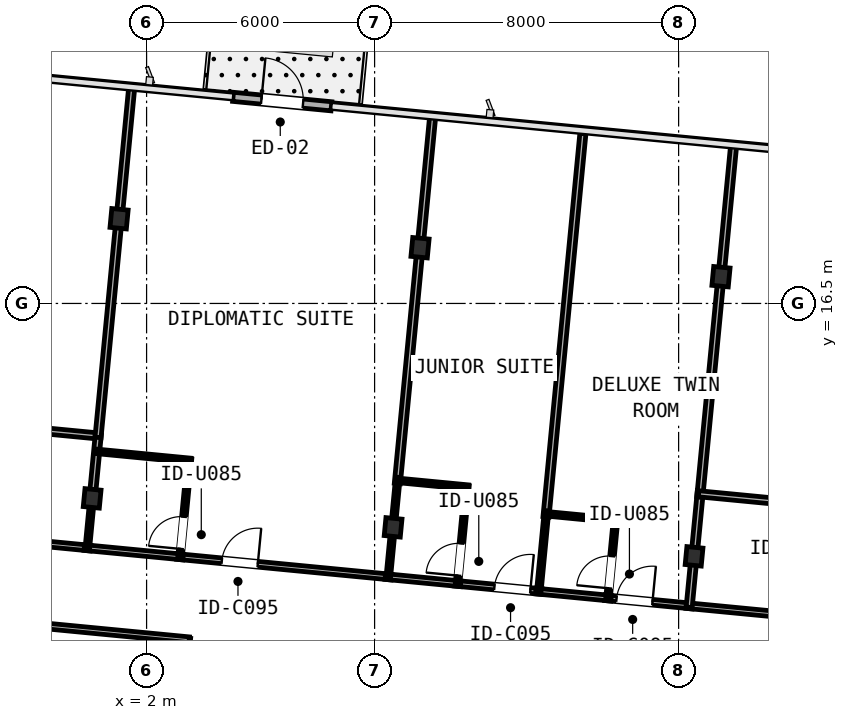
"""IFC4 building model, lengths in metres.
Left out: names, types, materials, properties, quantities, classifications, styles, units other than length and angle.
Written with IfcOpenShell. Run it as: python <this file> out.ifc"""

import sys

from ifc_helpers import new_model, si_unit, direction, frame, frame_2d, origin, origin_2d, place, context, subcontext, project, spatial, rectangle, i_section, extrude, element, fill, save


model = new_model("IFC4")
c1 = context("Model", 3, precision=1e-05, world=origin(), true_north=direction((0.0, 1.0)))
c2 = subcontext(c1, "Body", "Model", "MODEL_VIEW")
j1 = project(units=[si_unit("LENGTHUNIT", "METRE"), si_unit("PLANEANGLEUNIT", "RADIAN")], contexts=[c1])
p1 = place(None, origin())
s1 = spatial("IfcSite", under=j1, at=p1, CompositionType="ELEMENT")
p2 = place(p1, origin())
s2 = spatial("IfcBuilding", under=s1, at=p2, CompositionType="ELEMENT")
p3 = place(p2, frame((0.0, 0.0, 142.8)))
s3 = spatial("IfcBuildingStorey", under=s2, at=p3, CompositionType="ELEMENT", Elevation=142.8)
p4 = place(p3, frame((0.568, 11.371, 0.0), z_axis=(0.0, 0.0, 1.0), x_axis=(0.995396198367, -0.09584575252, 0.0)))
e1 = element("IfcColumn", 1, at=p4, inside=s3, PredefinedType="COLUMN", context=c2, shape_type="SweptSolid", body=[
    extrude(i_section(OverallWidth=0.424, OverallDepth=0.474, WebThickness=0.048, FlangeThickness=0.077, FilletRadius=0.031, at=origin_2d()), origin(), (0.0, 0.0, 1.0), 3.45),
])
p5 = place(p3, frame((1.276, 18.729, 0.0), z_axis=(0.0, 0.0, 1.0), x_axis=(0.995396198367, -0.09584575252, 0.0)))
e2 = element("IfcColumn", 2, at=p5, inside=s3, PredefinedType="COLUMN", context=c2, shape_type="SweptSolid", body=[
    extrude(i_section(OverallWidth=0.432, OverallDepth=0.498, WebThickness=0.056, FlangeThickness=0.089, FilletRadius=0.031, at=origin_2d()), origin(), (0.0, 0.0, 1.0), 3.45),
])
p6 = place(p3, frame((8.487, 10.609, 0.0), z_axis=(0.0, 0.0, 1.0), x_axis=(0.995396198367, -0.09584575252, 0.0)))
e3 = element("IfcColumn", 3, at=p6, inside=s3, PredefinedType="COLUMN", context=c2, shape_type="SweptSolid", body=[
    extrude(i_section(OverallWidth=0.424, OverallDepth=0.474, WebThickness=0.048, FlangeThickness=0.077, FilletRadius=0.031, at=origin_2d()), origin(), (0.0, 0.0, 1.0), 3.45),
])
p7 = place(p3, frame((9.195, 17.967, 0.0), z_axis=(0.0, 0.0, 1.0), x_axis=(0.995396198367, -0.09584575252, 0.0)))
e4 = element("IfcColumn", 4, at=p7, inside=s3, PredefinedType="COLUMN", context=c2, shape_type="SweptSolid", body=[
    extrude(i_section(OverallWidth=0.432, OverallDepth=0.498, WebThickness=0.056, FlangeThickness=0.089, FilletRadius=0.031, at=origin_2d()), origin(), (0.0, 0.0, 1.0), 3.45),
])
p8 = place(p3, frame((16.406, 9.846, 0.0), z_axis=(0.0, 0.0, 1.0), x_axis=(0.995396198367, -0.09584575252, 0.0)))
e5 = element("IfcColumn", 5, at=p8, inside=s3, PredefinedType="COLUMN", context=c2, shape_type="SweptSolid", body=[
    extrude(i_section(OverallWidth=0.424, OverallDepth=0.474, WebThickness=0.048, FlangeThickness=0.077, FilletRadius=0.031, at=origin_2d()), origin(), (0.0, 0.0, 1.0), 3.45),
])
p9 = place(p3, frame((17.115, 17.204, 0.0), z_axis=(0.0, 0.0, 1.0), x_axis=(0.995396198367, -0.09584575252, 0.0)))
e6 = element("IfcColumn", 6, at=p9, inside=s3, PredefinedType="COLUMN", context=c2, shape_type="SweptSolid", body=[
    extrude(i_section(OverallWidth=0.432, OverallDepth=0.498, WebThickness=0.056, FlangeThickness=0.089, FilletRadius=0.031, at=origin_2d()), origin(), (0.0, 0.0, 1.0), 3.45),
])
p10 = place(p3, frame((4.275, 21.937, 0.0), z_axis=(0.0, 0.0, 1.0), x_axis=(0.995394049959, -0.095868061976, 0.0)))
e7 = element("IfcWall", 7, at=p10, inside=s3, PredefinedType="STANDARD", context=c2, shape_type="SweptSolid", body=[
    extrude(rectangle(XDim=2.6, YDim=0.24, at=frame_2d((1.3, 0.0))), origin(), (0.0, 0.0, 1.0), 3.19),
])
p11 = place(p10, frame((0.75, 0.0, 0.0)))
e8 = element("IfcOpeningElement", 8, at=p11, cuts=e7, PredefinedType="OPENING", context=c2, shape_type="SweptSolid", body=[
    extrude(rectangle(XDim=1.1, YDim=2.15, at=frame_2d((0.55, 1.075))), frame((0.0, 0.13, 0.0), z_axis=(0.0, -1.0, 0.0), x_axis=(1.0, 0.0, 0.0)), (0.0, 0.0, 1.0), 0.26),
])
p12 = place(p3, frame((-7.559, 10.84, 0.0), z_axis=(0.0, 0.0, 1.0), x_axis=(0.995395467524, -0.095853342309, 0.0)))
e9 = element("IfcWall", 9, at=p12, inside=s3, PredefinedType="PARTITIONING", context=c2, shape_type="SweptSolid", body=[
    extrude(rectangle(XDim=8.12, YDim=0.15, at=frame_2d((4.06, 0.0))), origin(), (0.0, 0.0, 1.0), 2.479),
])
p13 = place(p12, frame((3.585, 0.0, 0.0)))
e10 = element("IfcOpeningElement", 10, at=p13, cuts=e9, PredefinedType="OPENING", context=c2, shape_type="SweptSolid", body=[
    extrude(rectangle(XDim=0.95, YDim=2.15, at=frame_2d((0.475, 1.075))), frame((0.0, 0.085, 0.0), z_axis=(0.0, -1.0, 0.0), x_axis=(1.0, 0.0, 0.0)), (0.0, 0.0, 1.0), 0.17),
])
p14 = place(p3, frame((2.799, 9.842, 0.0), z_axis=(0.0, 0.0, 1.0), x_axis=(0.995395844771, -0.095849424686, 0.0)))
e11 = element("IfcWall", 11, at=p14, inside=s3, PredefinedType="PARTITIONING", context=c2, shape_type="SweptSolid", body=[
    extrude(rectangle(XDim=5.67, YDim=0.15, at=frame_2d((2.835, 0.0))), origin(), (0.0, 0.0, 1.0), 2.479),
])
p15 = place(p14, frame((1.186, 0.0, 0.0)))
e12 = element("IfcOpeningElement", 12, at=p15, cuts=e11, PredefinedType="OPENING", context=c2, shape_type="SweptSolid", body=[
    extrude(rectangle(XDim=0.95, YDim=2.15, at=frame_2d((0.475, 1.075))), frame((0.0, 0.085, 0.0), z_axis=(0.0, -1.0, 0.0), x_axis=(1.0, 0.0, 0.0)), (0.0, 0.0, 1.0), 0.17),
])
p16 = place(p3, frame((0.361, 10.077, 0.0), z_axis=(0.0, 0.0, 1.0), x_axis=(0.995397556197, -0.095831649869, 0.0)))
e13 = element("IfcWall", 13, at=p16, inside=s3, PredefinedType="PARTITIONING", context=c2, shape_type="SweptSolid", body=[
    extrude(rectangle(XDim=2.614, YDim=0.15, at=frame_2d((1.307, 0.0))), origin(), (0.0, 0.0, 1.0), 2.479),
])
p17 = place(p3, frame((10.101, 9.139, 0.0), z_axis=(0.0, 0.0, 1.0), x_axis=(0.995393345625, -0.095875374756, 0.0)))
e14 = element("IfcWall", 14, at=p17, inside=s3, PredefinedType="PARTITIONING", context=c2, shape_type="SweptSolid", body=[
    extrude(rectangle(XDim=2.312, YDim=0.15, at=frame_2d((1.156, 0.0))), origin(), (0.0, 0.0, 1.0), 2.718),
])
p18 = place(p17, frame((1.056, 0.0, 0.0)))
e15 = element("IfcOpeningElement", 15, at=p18, cuts=e14, PredefinedType="OPENING", context=c2, shape_type="SweptSolid", body=[
    extrude(rectangle(XDim=0.95, YDim=2.15, at=frame_2d((0.475, 1.075))), frame((0.0, 0.085, 0.0), z_axis=(0.0, -1.0, 0.0), x_axis=(1.0, 0.0, 0.0)), (0.0, 0.0, 1.0), 0.17),
])
p19 = place(p3, frame((8.28, 9.314, 0.0), z_axis=(0.0, 0.0, 1.0), x_axis=(0.995393086543, -0.095878064554, 0.0)))
e16 = element("IfcWall", 16, at=p19, inside=s3, PredefinedType="PARTITIONING", context=c2, shape_type="SweptSolid", body=[
    extrude(rectangle(XDim=1.994, YDim=0.15, at=frame_2d((0.997, 0.0))), origin(), (0.0, 0.0, 1.0), 2.479),
])
p20 = place(p3, frame((14.061, 8.758, 0.0), z_axis=(0.0, 0.0, 1.0), x_axis=(0.995393345625, -0.095875374756, 0.0)))
e17 = element("IfcWall", 17, at=p20, inside=s3, PredefinedType="PARTITIONING", context=c2, shape_type="SweptSolid", body=[
    extrude(rectangle(XDim=2.312, YDim=0.15, at=frame_2d((1.156, 0.0))), origin(), (0.0, 0.0, 1.0), 2.479),
])
p21 = place(p20, frame((0.306, 0.0, 0.0)))
e18 = element("IfcOpeningElement", 18, at=p21, cuts=e17, PredefinedType="OPENING", context=c2, shape_type="SweptSolid", body=[
    extrude(rectangle(XDim=0.95, YDim=2.15, at=frame_2d((0.475, 1.075))), frame((0.0, 0.085, 0.0), z_axis=(0.0, -1.0, 0.0), x_axis=(1.0, 0.0, 0.0)), (0.0, 0.0, 1.0), 0.17),
])
p22 = place(p3, frame((12.24, 8.933, 0.0), z_axis=(0.0, 0.0, 1.0), x_axis=(0.995405888026, -0.095745068196, 0.0)))
e19 = element("IfcWall", 19, at=p22, inside=s3, PredefinedType="PARTITIONING", context=c2, shape_type="SweptSolid", body=[
    extrude(rectangle(XDim=1.994, YDim=0.15, at=frame_2d((0.997, 0.0))), origin(), (0.0, 0.0, 1.0), 2.718),
])
p23 = place(p3, frame((16.199, 8.552, 0.0), z_axis=(0.0, 0.0, 1.0), x_axis=(0.995391104887, -0.095898635608, 0.0)))
e20 = element("IfcWall", 20, at=p23, inside=s3, PredefinedType="PARTITIONING", context=c2, shape_type="SweptSolid", body=[
    extrude(rectangle(XDim=3.722, YDim=0.15, at=frame_2d((1.861, 0.0))), origin(), (0.0, 0.0, 1.0), 2.479),
])
p24 = place(p23, frame((2.457, 0.0, 0.0)))
e21 = element("IfcOpeningElement", 21, at=p24, cuts=e20, PredefinedType="OPENING", context=c2, shape_type="SweptSolid", body=[
    extrude(rectangle(XDim=0.95, YDim=2.15, at=frame_2d((0.475, 1.075))), frame((0.0, 0.085, 0.0), z_axis=(0.0, -1.0, 0.0), x_axis=(1.0, 0.0, 0.0)), (0.0, 0.0, 1.0), 0.17),
])
p25 = place(p3, frame((2.838, 5.135, 0.0), z_axis=(0.0, 0.0, 1.0), x_axis=(0.095772090971, 0.995403288417, 0.0)))
e22 = element("IfcWall", 22, at=p25, inside=s3, PredefinedType="PARTITIONING", context=c2, shape_type="SweptSolid", body=[
    extrude(rectangle(XDim=2.572, YDim=0.15, at=frame_2d((1.286, 0.0))), origin(), (0.0, 0.0, 1.0), 2.479),
])
p26 = place(p3, frame((3.121, 7.651, 0.0), z_axis=(0.0, 0.0, 1.0), x_axis=(-0.995397135603, 0.095836018457, 0.0)))
e23 = element("IfcWall", 23, at=p26, inside=s3, PredefinedType="PARTITIONING", context=c2, shape_type="SweptSolid", body=[
    extrude(rectangle(XDim=18.892, YDim=0.15, at=frame_2d((9.446, 0.0))), origin(), (0.0, 0.0, 1.0), 2.479),
])
p27 = place(p26, frame((14.502, 0.0, 0.0)))
e24 = element("IfcOpeningElement", 24, at=p27, cuts=e23, PredefinedType="OPENING", context=c2, shape_type="SweptSolid", body=[
    extrude(rectangle(XDim=0.95, YDim=2.15, at=frame_2d((0.475, 1.075))), frame((0.0, 0.085, 0.0), z_axis=(0.0, -1.0, 0.0), x_axis=(1.0, 0.0, 0.0)), (0.0, 0.0, 1.0), 0.17),
])
p28 = place(p3, frame((-3.284, 13.4, 0.0), z_axis=(0.0, 0.0, 1.0), x_axis=(0.995395934192, -0.095848496045, 0.0)))
e25 = element("IfcWall", 25, at=p28, inside=s3, PredefinedType="PARTITIONING", context=c2, shape_type="SweptSolid", body=[
    extrude(rectangle(XDim=4.068, YDim=0.16, at=frame_2d((2.034, 0.0))), origin(), (0.0, 0.0, 1.0), 2.479),
])
p29 = place(p28, frame((0.386, 0.0, 0.0)))
e26 = element("IfcOpeningElement", 26, at=p29, cuts=e25, PredefinedType="OPENING", context=c2, shape_type="SweptSolid", body=[
    extrude(rectangle(XDim=0.95, YDim=2.15, at=frame_2d((0.475, 1.075))), frame((0.0, 0.09, 0.0), z_axis=(0.0, -1.0, 0.0), x_axis=(1.0, 0.0, 0.0)), (0.0, 0.0, 1.0), 0.18),
])
p30 = place(p3, frame((0.729, 13.053, 0.0), z_axis=(0.0, 0.0, 1.0), x_axis=(-0.095783075571, -0.995402231479, 0.0)))
e27 = element("IfcWall", 27, at=p30, inside=s3, PredefinedType="PARTITIONING", context=c2, shape_type="SweptSolid", body=[
    extrude(rectangle(XDim=1.514, YDim=0.16, at=frame_2d((0.757, 0.0))), origin(), (0.0, 0.0, 1.0), 2.479),
])
p31 = place(p3, frame((0.551, 11.196, 0.0), z_axis=(0.0, 0.0, 1.0), x_axis=(-0.096017994315, -0.995379598328, 0.0)))
e28 = element("IfcWall", 28, at=p31, inside=s3, PredefinedType="PARTITIONING", context=c2, shape_type="SweptSolid", body=[
    extrude(rectangle(XDim=1.172, YDim=0.12, at=frame_2d((0.586, 0.0))), origin(), (0.0, 0.0, 1.0), 2.479),
])
p32 = place(p3, frame((1.259, 18.554, 0.0), z_axis=(0.0, 0.0, 1.0), x_axis=(-0.095807834241, -0.995399848753, 0.0)))
e29 = element("IfcWall", 29, at=p32, inside=s3, PredefinedType="PARTITIONING", context=c2, shape_type="SweptSolid", body=[
    extrude(rectangle(XDim=5.606, YDim=0.16, at=frame_2d((2.803, 0.0))), origin(), (0.0, 0.0, 1.0), 2.479),
])
p33 = place(p3, frame((1.613, 22.233, 0.0), z_axis=(0.0, 0.0, 1.0), x_axis=(-0.095787528641, -0.99540180297, 0.0)))
e30 = element("IfcWall", 30, at=p33, inside=s3, PredefinedType="PARTITIONING", context=c2, shape_type="SweptSolid", body=[
    extrude(rectangle(XDim=3.344, YDim=0.16, at=frame_2d((1.672, 0.0))), origin(), (0.0, 0.0, 1.0), 3.19),
])
p34 = place(p3, frame((2.877, 9.794, 0.0), z_axis=(0.0, 0.0, 1.0), x_axis=(0.095891053428, 0.995391835345, 0.0)))
e31 = element("IfcWall", 31, at=p34, inside=s3, PredefinedType="PARTITIONING", context=c2, shape_type="SweptSolid", body=[
    extrude(rectangle(XDim=2.63, YDim=0.12, at=frame_2d((1.315, 0.0))), origin(), (0.0, 0.0, 1.0), 2.479),
])
p35 = place(p34, frame((0.247, 0.0, 0.0)))
e32 = element("IfcOpeningElement", 32, at=p35, cuts=e31, PredefinedType="OPENING", context=c2, shape_type="SweptSolid", body=[
    extrude(rectangle(XDim=0.85, YDim=2.1, at=frame_2d((0.425, 1.05))), frame((0.0, 0.07, 0.0), z_axis=(0.0, -1.0, 0.0), x_axis=(1.0, 0.0, 0.0)), (0.0, 0.0, 1.0), 0.14),
])
p36 = place(p3, frame((3.165, 12.369, 0.0), z_axis=(0.0, 0.0, 1.0), x_axis=(-0.995389028655, 0.095920183663, 0.0)))
e33 = element("IfcWall", 33, at=p36, inside=s3, PredefinedType="PARTITIONING", context=c2, shape_type="SweptSolid", body=[
    extrude(rectangle(XDim=2.53, YDim=0.12, at=frame_2d((1.265, 0.0))), origin(), (0.0, 0.0, 1.0), 2.479),
])
p37 = place(p3, frame((9.178, 17.791, 0.0), z_axis=(0.0, 0.0, 1.0), x_axis=(-0.095826863488, -0.995398016993, 0.0)))
e34 = element("IfcWall", 34, at=p37, inside=s3, PredefinedType="PARTITIONING", context=c2, shape_type="SweptSolid", body=[
    extrude(rectangle(XDim=6.056, YDim=0.16, at=frame_2d((3.028, 0.0))), origin(), (0.0, 0.0, 1.0), 2.479),
])
p38 = place(p3, frame((9.533, 21.47, 0.0), z_axis=(0.0, 0.0, 1.0), x_axis=(-0.095859866796, -0.995394839216, 0.0)))
e35 = element("IfcWall", 35, at=p38, inside=s3, PredefinedType="PARTITIONING", context=c2, shape_type="SweptSolid", body=[
    extrude(rectangle(XDim=3.344, YDim=0.16, at=frame_2d((1.672, 0.0))), origin(), (0.0, 0.0, 1.0), 3.19),
])
p39 = place(p3, frame((8.47, 10.433, 0.0), z_axis=(0.0, 0.0, 1.0), x_axis=(-0.095831494917, -0.995397571115, 0.0)))
e36 = element("IfcWall", 36, at=p39, inside=s3, PredefinedType="PARTITIONING", context=c2, shape_type="SweptSolid", body=[
    extrude(rectangle(XDim=1.172, YDim=0.12, at=frame_2d((0.586, 0.0))), origin(), (0.0, 0.0, 1.0), 2.479),
])
p40 = place(p3, frame((8.614, 11.927, 0.0), z_axis=(0.0, 0.0, 1.0), x_axis=(-0.09590284245, -0.99539069958, 0.0)))
e37 = element("IfcWall", 37, at=p40, inside=s3, PredefinedType="PARTITIONING", context=c2, shape_type="SweptSolid", body=[
    extrude(rectangle(XDim=1.148, YDim=0.12, at=frame_2d((0.574, 0.0))), origin(), (0.0, 0.0, 1.0), 2.479),
])
p41 = place(p3, frame((10.179, 9.091, 0.0), z_axis=(0.0, 0.0, 1.0), x_axis=(0.095799078022, 0.995400691506, 0.0)))
e38 = element("IfcWall", 38, at=p41, inside=s3, PredefinedType="PARTITIONING", context=c2, shape_type="SweptSolid", body=[
    extrude(rectangle(XDim=2.63, YDim=0.12, at=frame_2d((1.315, 0.0))), origin(), (0.0, 0.0, 1.0), 2.479),
])
p42 = place(p41, frame((0.247, 0.0, 0.0)))
e39 = element("IfcOpeningElement", 39, at=p42, cuts=e38, PredefinedType="OPENING", context=c2, shape_type="SweptSolid", body=[
    extrude(rectangle(XDim=0.85, YDim=2.1, at=frame_2d((0.425, 1.05))), frame((0.0, 0.07, 0.0), z_axis=(0.0, -1.0, 0.0), x_axis=(1.0, 0.0, 0.0)), (0.0, 0.0, 1.0), 0.14),
])
p43 = place(p3, frame((10.467, 11.666, 0.0), z_axis=(0.0, 0.0, 1.0), x_axis=(-0.995405983929, 0.095744071139, 0.0)))
e40 = element("IfcWall", 40, at=p43, inside=s3, PredefinedType="PARTITIONING", context=c2, shape_type="SweptSolid", body=[
    extrude(rectangle(XDim=1.91, YDim=0.12, at=frame_2d((0.955, 0.0))), origin(), (0.0, 0.0, 1.0), 2.479),
])
p44 = place(p3, frame((13.481, 20.97, 0.0), z_axis=(0.0, 0.0, 1.0), x_axis=(-0.095852900965, -0.995395510024, 0.0)))
e41 = element("IfcWall", 41, at=p44, inside=s3, PredefinedType="PARTITIONING", context=c2, shape_type="SweptSolid", body=[
    extrude(rectangle(XDim=10.132, YDim=0.16, at=frame_2d((5.066, 0.0))), origin(), (0.0, 0.0, 1.0), 2.557),
])
p45 = place(p3, frame((12.526, 11.048, 0.0), z_axis=(0.0, 0.0, 1.0), x_axis=(-0.095875173929, -0.995393364969, 0.0)))
e42 = element("IfcWall", 42, at=p45, inside=s3, PredefinedType="PARTITIONING", context=c2, shape_type="SweptSolid", body=[
    extrude(rectangle(XDim=2.172, YDim=0.12, at=frame_2d((1.086, 0.0))), origin(), (0.0, 0.0, 1.0), 2.479),
])
p46 = place(p3, frame((14.139, 8.71, 0.0), z_axis=(0.0, 0.0, 1.0), x_axis=(0.095825980341, 0.995398102013, 0.0)))
e43 = element("IfcWall", 43, at=p46, inside=s3, PredefinedType="PARTITIONING", context=c2, shape_type="SweptSolid", body=[
    extrude(rectangle(XDim=2.13, YDim=0.12, at=frame_2d((1.065, 0.0))), origin(), (0.0, 0.0, 1.0), 2.479),
])
p47 = place(p46, frame((0.296, 0.0, 0.0)))
e44 = element("IfcOpeningElement", 44, at=p47, cuts=e43, PredefinedType="OPENING", context=c2, shape_type="SweptSolid", body=[
    extrude(rectangle(XDim=0.85, YDim=2.1, at=frame_2d((0.425, 1.05))), frame((0.0, 0.07, 0.0), z_axis=(0.0, -1.0, 0.0), x_axis=(1.0, 0.0, 0.0)), (0.0, 0.0, 1.0), 0.14),
])
p48 = place(p3, frame((14.379, 10.787, 0.0), z_axis=(0.0, 0.0, 1.0), x_axis=(-0.995393793358, 0.095870726213, 0.0)))
e45 = element("IfcWall", 45, at=p48, inside=s3, PredefinedType="PARTITIONING", context=c2, shape_type="SweptSolid", body=[
    extrude(rectangle(XDim=1.91, YDim=0.12, at=frame_2d((0.955, 0.0))), origin(), (0.0, 0.0, 1.0), 2.718),
])
p49 = place(p3, frame((16.389, 9.671, 0.0), z_axis=(0.0, 0.0, 1.0), x_axis=(-0.095811626391, -0.995399483749, 0.0)))
e46 = element("IfcWall", 46, at=p49, inside=s3, PredefinedType="PARTITIONING", context=c2, shape_type="SweptSolid", body=[
    extrude(rectangle(XDim=1.172, YDim=0.16, at=frame_2d((0.586, 0.0))), origin(), (0.0, 0.0, 1.0), 2.479),
])
p50 = place(p3, frame((16.572, 11.57, 0.0), z_axis=(0.0, 0.0, 1.0), x_axis=(-0.095867871334, -0.99539406832, 0.0)))
e47 = element("IfcWall", 47, at=p50, inside=s3, PredefinedType="PARTITIONING", context=c2, shape_type="SweptSolid", body=[
    extrude(rectangle(XDim=1.556, YDim=0.16, at=frame_2d((0.778, 0.0))), origin(), (0.0, 0.0, 1.0), 2.479),
])
p51 = place(p3, frame((17.098, 17.029, 0.0), z_axis=(0.0, 0.0, 1.0), x_axis=(-0.095831010877, -0.995397617716, 0.0)))
e48 = element("IfcWall", 48, at=p51, inside=s3, PredefinedType="PARTITIONING", context=c2, shape_type="SweptSolid", body=[
    extrude(rectangle(XDim=5.648, YDim=0.16, at=frame_2d((2.824, 0.0))), origin(), (0.0, 0.0, 1.0), 2.479),
])
p52 = place(p3, frame((17.452, 20.708, 0.0), z_axis=(0.0, 0.0, 1.0), x_axis=(-0.095859866796, -0.995394839216, 0.0)))
e49 = element("IfcWall", 49, at=p52, inside=s3, PredefinedType="PARTITIONING", context=c2, shape_type="SweptSolid", body=[
    extrude(rectangle(XDim=3.344, YDim=0.16, at=frame_2d((1.672, 0.0))), origin(), (0.0, 0.0, 1.0), 3.19),
])
p53 = place(p3, frame((16.525, 11.492, 0.0), z_axis=(0.0, 0.0, 1.0), x_axis=(0.995395561935, -0.095852361889, 0.0)))
e50 = element("IfcWall", 50, at=p53, inside=s3, PredefinedType="PARTITIONING", context=c2, shape_type="SweptSolid", body=[
    extrude(rectangle(XDim=3.324, YDim=0.16, at=frame_2d((1.662, 0.0))), origin(), (0.0, 0.0, 1.0), 2.479),
])
p54 = place(p53, frame((2.004, 0.0, 0.0)))
e51 = element("IfcOpeningElement", 51, at=p54, cuts=e50, PredefinedType="OPENING", context=c2, shape_type="SweptSolid", body=[
    extrude(rectangle(XDim=0.95, YDim=2.15, at=frame_2d((0.475, 1.075))), frame((0.0, 0.09, 0.0), z_axis=(0.0, -1.0, 0.0), x_axis=(1.0, 0.0, 0.0)), (0.0, 0.0, 1.0), 0.18),
])
p55 = place(p11, origin())
e52 = element("IfcDoor", 52, at=p55, inside=s3, OperationType="SINGLE_SWING_LEFT", PredefinedType="DOOR", context=c2, shape_type="SweptSolid", body=[
    extrude(rectangle(XDim=1.1, YDim=2.15, at=frame_2d((0.55, 1.075))), frame((0.0, 0.025, 0.0), z_axis=(0.0, -1.0, 0.0), x_axis=(1.0, 0.0, 0.0)), (0.0, 0.0, 1.0), 0.05),
])
fill(e8, e52)
p56 = place(p15, frame((0.95, 0.0, 0.0), z_axis=(0.0, 0.0, 1.0), x_axis=(-1.0, 0.0, 0.0)))
e53 = element("IfcDoor", 53, at=p56, inside=s3, OperationType="SINGLE_SWING_RIGHT", PredefinedType="DOOR", context=c2, shape_type="SweptSolid", body=[
    extrude(rectangle(XDim=0.95, YDim=2.15, at=frame_2d((0.475, 1.075))), frame((0.0, 0.025, 0.0), z_axis=(0.0, -1.0, 0.0), x_axis=(1.0, 0.0, 0.0)), (0.0, 0.0, 1.0), 0.05),
])
fill(e12, e53)
p57 = place(p35, frame((0.85, 0.0, 0.0), z_axis=(0.0, 0.0, 1.0), x_axis=(-1.0, 0.0, 0.0)))
e54 = element("IfcDoor", 54, at=p57, inside=s3, OperationType="SINGLE_SWING_LEFT", PredefinedType="DOOR", context=c2, shape_type="SweptSolid", body=[
    extrude(rectangle(XDim=0.85, YDim=2.1, at=frame_2d((0.425, 1.05))), frame((0.0, 0.025, 0.0), z_axis=(0.0, -1.0, 0.0), x_axis=(1.0, 0.0, 0.0)), (0.0, 0.0, 1.0), 0.05),
])
fill(e32, e54)
p58 = place(p18, frame((0.95, 0.0, 0.0), z_axis=(0.0, 0.0, 1.0), x_axis=(-1.0, 0.0, 0.0)))
e55 = element("IfcDoor", 55, at=p58, inside=s3, OperationType="SINGLE_SWING_RIGHT", PredefinedType="DOOR", context=c2, shape_type="SweptSolid", body=[
    extrude(rectangle(XDim=0.95, YDim=2.15, at=frame_2d((0.475, 1.075))), frame((0.0, 0.025, 0.0), z_axis=(0.0, -1.0, 0.0), x_axis=(1.0, 0.0, 0.0)), (0.0, 0.0, 1.0), 0.05),
])
fill(e15, e55)
p59 = place(p42, frame((0.85, 0.0, 0.0), z_axis=(0.0, 0.0, 1.0), x_axis=(-1.0, 0.0, 0.0)))
e56 = element("IfcDoor", 56, at=p59, inside=s3, OperationType="SINGLE_SWING_LEFT", PredefinedType="DOOR", context=c2, shape_type="SweptSolid", body=[
    extrude(rectangle(XDim=0.85, YDim=2.1, at=frame_2d((0.425, 1.05))), frame((0.0, 0.025, 0.0), z_axis=(0.0, -1.0, 0.0), x_axis=(1.0, 0.0, 0.0)), (0.0, 0.0, 1.0), 0.05),
])
fill(e39, e56)
p60 = place(p21, frame((0.95, 0.0, 0.0), z_axis=(0.0, 0.0, 1.0), x_axis=(-1.0, 0.0, 0.0)))
e57 = element("IfcDoor", 57, at=p60, inside=s3, OperationType="SINGLE_SWING_RIGHT", PredefinedType="DOOR", context=c2, shape_type="SweptSolid", body=[
    extrude(rectangle(XDim=0.95, YDim=2.15, at=frame_2d((0.475, 1.075))), frame((0.0, 0.025, 0.0), z_axis=(0.0, -1.0, 0.0), x_axis=(1.0, 0.0, 0.0)), (0.0, 0.0, 1.0), 0.05),
])
fill(e18, e57)
p61 = place(p47, origin())
e58 = element("IfcDoor", 58, at=p61, inside=s3, OperationType="SINGLE_SWING_LEFT", PredefinedType="DOOR", context=c2, shape_type="SweptSolid", body=[
    extrude(rectangle(XDim=0.85, YDim=2.1, at=frame_2d((0.425, 1.05))), frame((0.0, 0.025, 0.0), z_axis=(0.0, -1.0, 0.0), x_axis=(1.0, 0.0, 0.0)), (0.0, 0.0, 1.0), 0.05),
])
fill(e44, e58)
save(model, sys.argv[1])
